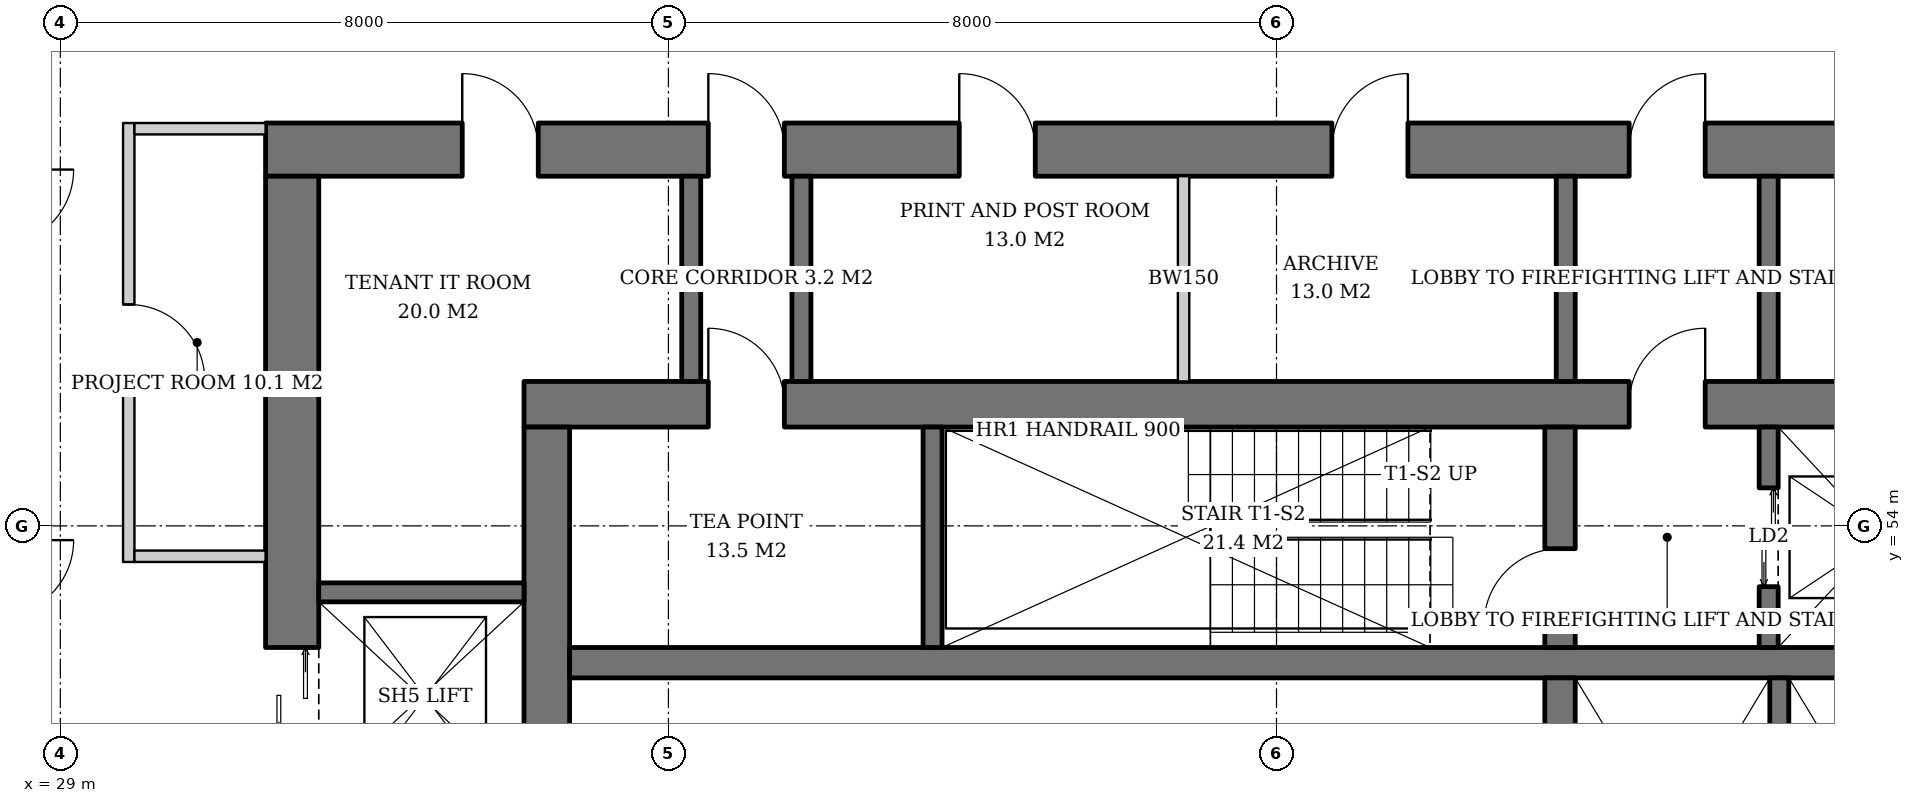
"""IFC4 building model, lengths in metres.
Left out: names, types, materials, properties, quantities, classifications, styles, units other than length and angle.
Written with IfcOpenShell. Run it as: python <this file> out.ifc"""

import sys

from ifc_helpers import new_model, si_unit, direction, frame, frame_2d, origin, place, context, subcontext, project, spatial, rectangle, extrude, element, fill, save


model = new_model("IFC4")
c1 = context("Model", 3, precision=1e-05, world=origin(), true_north=direction((0.0, 1.0)))
c2 = subcontext(c1, "Body", "Model", "MODEL_VIEW")
j1 = project(units=[si_unit("LENGTHUNIT", "METRE"), si_unit("PLANEANGLEUNIT", "RADIAN")], contexts=[c1])
p1 = place(None, origin())
s1 = spatial("IfcSite", under=j1, at=p1, CompositionType="ELEMENT")
p2 = place(p1, origin())
s2 = spatial("IfcBuilding", under=s1, at=p2, CompositionType="ELEMENT")
p3 = place(p2, frame((0.0, 0.0, 93.2)))
s3 = spatial("IfcBuildingStorey", under=s2, at=p3, CompositionType="ELEMENT", Elevation=93.2)
p4 = place(p3, frame((35.1, 55.6, 0.0), z_axis=(0.0, 0.0, 1.0), x_axis=(1.0, 0.0, 0.0)))
e1 = element("IfcWall", 1, at=p4, inside=s3, PredefinedType="SHEAR", context=c2, shape_type="SweptSolid", body=[
    extrude(rectangle(XDim=19.8, YDim=0.6, at=frame_2d((9.9, 0.0))), origin(), (0.0, 0.0, 1.0), 3.8),
])
p5 = place(p4, frame((14.54, 0.0, 0.0)))
e2 = element("IfcOpeningElement", 2, at=p5, cuts=e1, PredefinedType="OPENING", context=c2, shape_type="SweptSolid", body=[
    extrude(rectangle(XDim=1.0, YDim=2.1, at=frame_2d((0.5, 1.05))), frame((0.0, 0.31, 0.0), z_axis=(0.0, -1.0, 0.0), x_axis=(1.0, 0.0, 0.0)), (0.0, 0.0, 1.0), 0.62),
])
p6 = place(p4, frame((2.425, 0.0, 0.0)))
e3 = element("IfcOpeningElement", 3, at=p6, cuts=e1, PredefinedType="OPENING", context=c2, shape_type="SweptSolid", body=[
    extrude(rectangle(XDim=1.0, YDim=2.1, at=frame_2d((0.5, 1.05))), frame((0.0, 0.31, 0.0), z_axis=(0.0, -1.0, 0.0), x_axis=(1.0, 0.0, 0.0)), (0.0, 0.0, 1.0), 0.62),
])
p7 = place(p3, frame((35.4, 36.7, 0.0), z_axis=(0.0, 0.0, 1.0), x_axis=(0.0, 1.0, 0.0)))
e4 = element("IfcWall", 4, at=p7, inside=s3, PredefinedType="SHEAR", context=c2, shape_type="SweptSolid", body=[
    extrude(rectangle(XDim=18.6, YDim=0.6, at=frame_2d((9.3, 0.0))), origin(), (0.0, 0.0, 1.0), 3.8),
])
p8 = place(p7, frame((8.4, 0.0, 0.0)))
e5 = element("IfcOpeningElement", 5, at=p8, cuts=e4, PredefinedType="OPENING", context=c2, shape_type="SweptSolid", body=[
    extrude(rectangle(XDim=1.8, YDim=2.4, at=frame_2d((0.9, 1.2))), frame((0.0, 0.31, 0.0), z_axis=(0.0, -1.0, 0.0), x_axis=(1.0, 0.0, 0.0)), (0.0, 0.0, 1.0), 0.62),
])
p9 = place(p3, frame((31.7, 58.95, 0.0), z_axis=(0.0, 0.0, 1.0), x_axis=(1.0, 0.0, 0.0)))
e6 = element("IfcWall", 6, at=p9, inside=s3, PredefinedType="SHEAR", context=c2, shape_type="SweptSolid", body=[
    extrude(rectangle(XDim=26.6, YDim=0.7, at=frame_2d((13.3, 0.0))), origin(), (0.0, 0.0, 1.0), 3.8),
])
p10 = place(p9, frame((17.94, 0.0, 0.0)))
e7 = element("IfcOpeningElement", 7, at=p10, cuts=e6, PredefinedType="OPENING", context=c2, shape_type="SweptSolid", body=[
    extrude(rectangle(XDim=1.0, YDim=2.1, at=frame_2d((0.5, 1.05))), frame((0.0, 0.36, 0.0), z_axis=(0.0, -1.0, 0.0), x_axis=(1.0, 0.0, 0.0)), (0.0, 0.0, 1.0), 0.72),
])
p11 = place(p9, frame((5.825, 0.0, 0.0)))
e8 = element("IfcOpeningElement", 8, at=p11, cuts=e6, PredefinedType="OPENING", context=c2, shape_type="SweptSolid", body=[
    extrude(rectangle(XDim=1.0, YDim=2.1, at=frame_2d((0.5, 1.05))), frame((0.0, 0.36, 0.0), z_axis=(0.0, -1.0, 0.0), x_axis=(1.0, 0.0, 0.0)), (0.0, 0.0, 1.0), 0.72),
])
p12 = place(p9, frame((2.587, 0.0, 0.0)))
e9 = element("IfcOpeningElement", 9, at=p12, cuts=e6, PredefinedType="OPENING", context=c2, shape_type="SweptSolid", body=[
    extrude(rectangle(XDim=1.0, YDim=2.1, at=frame_2d((0.5, 1.05))), frame((0.0, 0.36, 0.0), z_axis=(0.0, -1.0, 0.0), x_axis=(1.0, 0.0, 0.0)), (0.0, 0.0, 1.0), 0.72),
])
p13 = place(p9, frame((9.126, 0.0, 0.0)))
e10 = element("IfcOpeningElement", 10, at=p13, cuts=e6, PredefinedType="OPENING", context=c2, shape_type="SweptSolid", body=[
    extrude(rectangle(XDim=1.0, YDim=2.1, at=frame_2d((0.5, 1.05))), frame((0.0, 0.36, 0.0), z_axis=(0.0, -1.0, 0.0), x_axis=(1.0, 0.0, 0.0)), (0.0, 0.0, 1.0), 0.72),
])
p14 = place(p9, frame((14.029, 0.0, 0.0)))
e11 = element("IfcOpeningElement", 11, at=p14, cuts=e6, PredefinedType="OPENING", context=c2, shape_type="SweptSolid", body=[
    extrude(rectangle(XDim=1.0, YDim=2.1, at=frame_2d((0.5, 1.05))), frame((0.0, 0.36, 0.0), z_axis=(0.0, -1.0, 0.0), x_axis=(1.0, 0.0, 0.0)), (0.0, 0.0, 1.0), 0.72),
])
p15 = place(p9, frame((22.4, 0.0, 0.0)))
e12 = element("IfcOpeningElement", 12, at=p15, cuts=e6, PredefinedType="OPENING", context=c2, shape_type="SweptSolid", body=[
    extrude(rectangle(XDim=1.0, YDim=2.1, at=frame_2d((0.5, 1.05))), frame((0.0, 0.36, 0.0), z_axis=(0.0, -1.0, 0.0), x_axis=(1.0, 0.0, 0.0)), (0.0, 0.0, 1.0), 0.72),
])
p16 = place(p3, frame((32.05, 33.4, 0.0), z_axis=(0.0, 0.0, 1.0), x_axis=(0.0, 1.0, 0.0)))
e13 = element("IfcWall", 13, at=p16, inside=s3, PredefinedType="SHEAR", context=c2, shape_type="SweptSolid", body=[
    extrude(rectangle(XDim=25.2, YDim=0.7, at=frame_2d((12.6, 0.0))), origin(), (0.0, 0.0, 1.0), 3.8),
])
p17 = place(p16, frame((3.45, 0.0, 0.0)))
e14 = element("IfcOpeningElement", 14, at=p17, cuts=e13, PredefinedType="OPENING", context=c2, shape_type="SweptSolid", body=[
    extrude(rectangle(XDim=1.3, YDim=2.2, at=frame_2d((0.65, 1.1))), frame((0.0, 0.36, 0.0), z_axis=(0.0, -1.0, 0.0), x_axis=(1.0, 0.0, 0.0)), (0.0, 0.0, 1.0), 0.72),
])
p18 = place(p16, frame((6.2, 0.0, 0.0)))
e15 = element("IfcOpeningElement", 15, at=p18, cuts=e13, PredefinedType="OPENING", context=c2, shape_type="SweptSolid", body=[
    extrude(rectangle(XDim=1.3, YDim=2.2, at=frame_2d((0.65, 1.1))), frame((0.0, 0.36, 0.0), z_axis=(0.0, -1.0, 0.0), x_axis=(1.0, 0.0, 0.0)), (0.0, 0.0, 1.0), 0.72),
])
p19 = place(p16, frame((8.95, 0.0, 0.0)))
e16 = element("IfcOpeningElement", 16, at=p19, cuts=e13, PredefinedType="OPENING", context=c2, shape_type="SweptSolid", body=[
    extrude(rectangle(XDim=1.3, YDim=2.2, at=frame_2d((0.65, 1.1))), frame((0.0, 0.36, 0.0), z_axis=(0.0, -1.0, 0.0), x_axis=(1.0, 0.0, 0.0)), (0.0, 0.0, 1.0), 0.72),
])
p20 = place(p16, frame((14.95, 0.0, 0.0)))
e17 = element("IfcOpeningElement", 17, at=p20, cuts=e13, PredefinedType="OPENING", context=c2, shape_type="SweptSolid", body=[
    extrude(rectangle(XDim=1.3, YDim=2.2, at=frame_2d((0.65, 1.1))), frame((0.0, 0.36, 0.0), z_axis=(0.0, -1.0, 0.0), x_axis=(1.0, 0.0, 0.0)), (0.0, 0.0, 1.0), 0.72),
])
p21 = place(p16, frame((17.7, 0.0, 0.0)))
e18 = element("IfcOpeningElement", 18, at=p21, cuts=e13, PredefinedType="OPENING", context=c2, shape_type="SweptSolid", body=[
    extrude(rectangle(XDim=1.3, YDim=2.2, at=frame_2d((0.65, 1.1))), frame((0.0, 0.36, 0.0), z_axis=(0.0, -1.0, 0.0), x_axis=(1.0, 0.0, 0.0)), (0.0, 0.0, 1.0), 0.72),
])
p22 = place(p16, frame((11.7, 0.0, 0.0)))
e19 = element("IfcOpeningElement", 19, at=p22, cuts=e13, PredefinedType="OPENING", context=c2, shape_type="SweptSolid", body=[
    extrude(rectangle(XDim=1.8, YDim=2.4, at=frame_2d((0.9, 1.2))), frame((0.0, 0.36, 0.0), z_axis=(0.0, -1.0, 0.0), x_axis=(1.0, 0.0, 0.0)), (0.0, 0.0, 1.0), 0.72),
])
p23 = place(p3, frame((35.7, 52.2, 0.0), z_axis=(0.0, 0.0, 1.0), x_axis=(1.0, 0.0, 0.0)))
e20 = element("IfcWall", 20, at=p23, inside=s3, PredefinedType="SHEAR", context=c2, shape_type="SweptSolid", body=[
    extrude(rectangle(XDim=18.6, YDim=0.4, at=frame_2d((9.3, 0.0))), origin(), (0.0, 0.0, 1.0), 3.8),
])
p24 = place(p3, frame((48.73, 40.0, 0.0), z_axis=(0.0, 0.0, 1.0), x_axis=(0.0, 1.0, 0.0)))
e21 = element("IfcWall", 21, at=p24, inside=s3, PredefinedType="SHEAR", context=c2, shape_type="SweptSolid", body=[
    extrude(rectangle(XDim=12.0, YDim=0.4, at=frame_2d((6.0, 0.0))), origin(), (0.0, 0.0, 1.0), 3.8),
])
p25 = place(p3, frame((48.73, 52.4, 0.0), z_axis=(0.0, 0.0, 1.0), x_axis=(0.0, 1.0, 0.0)))
e22 = element("IfcWall", 22, at=p25, inside=s3, PredefinedType="SHEAR", context=c2, shape_type="SweptSolid", body=[
    extrude(rectangle(XDim=2.9, YDim=0.4, at=frame_2d((1.45, 0.0))), origin(), (0.0, 0.0, 1.0), 3.8),
])
p26 = place(p25, frame((0.3, 0.0, 0.0)))
e23 = element("IfcOpeningElement", 23, at=p26, cuts=e22, PredefinedType="OPENING", context=c2, shape_type="SweptSolid", body=[
    extrude(rectangle(XDim=1.0, YDim=2.1, at=frame_2d((0.5, 1.05))), frame((0.0, 0.21, 0.0), z_axis=(0.0, -1.0, 0.0), x_axis=(1.0, 0.0, 0.0)), (0.0, 0.0, 1.0), 0.42),
])
p27 = place(p3, frame((40.475, 52.4, 0.0), z_axis=(0.0, 0.0, 1.0), x_axis=(0.0, 1.0, 0.0)))
e24 = element("IfcWall", 24, at=p27, inside=s3, PredefinedType="SHEAR", context=c2, shape_type="SweptSolid", body=[
    extrude(rectangle(XDim=2.9, YDim=0.25, at=frame_2d((1.45, 0.0))), origin(), (0.0, 0.0, 1.0), 3.8),
])
p28 = place(p3, frame((51.475, 52.4, 0.0), z_axis=(0.0, 0.0, 1.0), x_axis=(0.0, 1.0, 0.0)))
e25 = element("IfcWall", 25, at=p28, inside=s3, PredefinedType="SHEAR", context=c2, shape_type="SweptSolid", body=[
    extrude(rectangle(XDim=2.9, YDim=0.25, at=frame_2d((1.45, 0.0))), origin(), (0.0, 0.0, 1.0), 3.8),
])
p29 = place(p28, frame((0.8, 0.0, 0.0)))
e26 = element("IfcOpeningElement", 26, at=p29, cuts=e25, PredefinedType="OPENING", context=c2, shape_type="SweptSolid", body=[
    extrude(rectangle(XDim=1.3, YDim=2.2, at=frame_2d((0.65, 1.1))), frame((0.0, 0.135, 0.0), z_axis=(0.0, -1.0, 0.0), x_axis=(1.0, 0.0, 0.0)), (0.0, 0.0, 1.0), 0.27),
])
p30 = place(p3, frame((51.615, 47.75, 0.0), z_axis=(0.0, 0.0, 1.0), x_axis=(0.0, 1.0, 0.0)))
e27 = element("IfcWall", 27, at=p30, inside=s3, PredefinedType="SHEAR", context=c2, shape_type="SweptSolid", body=[
    extrude(rectangle(XDim=4.25, YDim=0.25, at=frame_2d((2.125, 0.0))), origin(), (0.0, 0.0, 1.0), 3.8),
])
p31 = place(p3, frame((32.4, 53.125, 0.0), z_axis=(0.0, 0.0, 1.0), x_axis=(1.0, 0.0, 0.0)))
e28 = element("IfcWall", 28, at=p31, inside=s3, PredefinedType="SHEAR", context=c2, shape_type="SweptSolid", body=[
    extrude(rectangle(XDim=2.7, YDim=0.25, at=frame_2d((1.35, 0.0))), origin(), (0.0, 0.0, 1.0), 3.8),
])
for number, where, z_axis, x_axis in (
    (29, (48.805, 55.9, 0.0), (0.0, 0.0, 1.0), (0.0, 1.0, 0.0)),
    (30, (51.475, 55.9, 0.0), (0.0, 0.0, 1.0), (0.0, 1.0, 0.0)),
    (31, (37.3, 55.9, 0.0), (0.0, 0.0, 1.0), (0.0, 1.0, 0.0)),
    (32, (38.75, 55.9, 0.0), (0.0, 0.0, 1.0), (0.0, 1.0, 0.0)),
):
    element("IfcWall", number, at=place(p3, frame(where, z_axis=z_axis, x_axis=x_axis)), inside=s3, PredefinedType="SOLIDWALL", context=c2, shape_type="SweptSolid", body=[
        extrude(rectangle(XDim=2.7, YDim=0.25, at=frame_2d((1.35, 0.0))), origin(), (0.0, 0.0, 1.0), 3.62),
    ])
p32 = place(p3, frame((43.778, 55.9, 0.0), z_axis=(0.0, 0.0, 1.0), x_axis=(0.0, 1.0, 0.0)))
e33 = element("IfcWall", 33, at=p32, inside=s3, PredefinedType="SOLIDWALL", context=c2, shape_type="SweptSolid", body=[
    extrude(rectangle(XDim=2.7, YDim=0.15, at=frame_2d((1.35, 0.0))), origin(), (0.0, 0.0, 1.0), 3.62),
])
p33 = place(p3, frame((29.9, 59.3, 0.0), z_axis=(0.0, 0.0, 1.0), x_axis=(0.0, -1.0, 0.0)))
e34 = element("IfcWall", 34, at=p33, inside=s3, PredefinedType="PARTITIONING", context=c2, shape_type="SweptSolid", body=[
    extrude(rectangle(XDim=5.775, YDim=0.15, at=frame_2d((2.888, 0.0))), origin(), (0.0, 0.0, 1.0), 2.72),
])
p34 = place(p33, frame((2.387, 0.0, 0.0)))
e35 = element("IfcOpeningElement", 35, at=p34, cuts=e34, PredefinedType="OPENING", context=c2, shape_type="SweptSolid", body=[
    extrude(rectangle(XDim=1.0, YDim=2.1, at=frame_2d((0.5, 1.05))), frame((0.0, 0.085, 0.0), z_axis=(0.0, -1.0, 0.0), x_axis=(1.0, 0.0, 0.0)), (0.0, 0.0, 1.0), 0.17),
])
for number, where, z_axis, x_axis in (
    (36, (31.7, 59.225, 0.0), (0.0, 0.0, 1.0), (-1.0, 0.0, 0.0)),
    (37, (31.7, 53.6, 0.0), (0.0, 0.0, 1.0), (-1.0, 0.0, 0.0)),
):
    element("IfcWall", number, at=place(p3, frame(where, z_axis=z_axis, x_axis=x_axis)), inside=s3, PredefinedType="PARTITIONING", context=c2, shape_type="SweptSolid", body=[
        extrude(rectangle(XDim=1.725, YDim=0.15, at=frame_2d((0.862, 0.0))), origin(), (0.0, 0.0, 1.0), 3.62),
    ])
p35 = place(p29, origin())
e38 = element("IfcDoor", 38, at=p35, inside=s3, OperationType="DOUBLE_DOOR_SLIDING", PredefinedType="DOOR", context=c2, shape_type="SweptSolid", body=[
    extrude(rectangle(XDim=1.3, YDim=2.2, at=frame_2d((0.65, 1.1))), frame((0.0, 0.025, 0.0), z_axis=(0.0, -1.0, 0.0), x_axis=(1.0, 0.0, 0.0)), (0.0, 0.0, 1.0), 0.05),
])
fill(e26, e38)
p36 = place(p26, origin())
e39 = element("IfcDoor", 39, at=p36, inside=s3, OperationType="SINGLE_SWING_LEFT", PredefinedType="DOOR", context=c2, shape_type="SweptSolid", body=[
    extrude(rectangle(XDim=1.0, YDim=2.1, at=frame_2d((0.5, 1.05))), frame((0.0, 0.025, 0.0), z_axis=(0.0, -1.0, 0.0), x_axis=(1.0, 0.0, 0.0)), (0.0, 0.0, 1.0), 0.05),
])
fill(e23, e39)
p37 = place(p5, origin())
e40 = element("IfcDoor", 40, at=p37, inside=s3, OperationType="SINGLE_SWING_RIGHT", PredefinedType="DOOR", context=c2, shape_type="SweptSolid", body=[
    extrude(rectangle(XDim=1.0, YDim=2.1, at=frame_2d((0.5, 1.05))), frame((0.0, 0.025, 0.0), z_axis=(0.0, -1.0, 0.0), x_axis=(1.0, 0.0, 0.0)), (0.0, 0.0, 1.0), 0.05),
])
fill(e2, e40)
p38 = place(p21, origin())
e41 = element("IfcDoor", 41, at=p38, inside=s3, OperationType="DOUBLE_DOOR_SLIDING", PredefinedType="DOOR", context=c2, shape_type="SweptSolid", body=[
    extrude(rectangle(XDim=1.3, YDim=2.2, at=frame_2d((0.65, 1.1))), frame((0.0, 0.025, 0.0), z_axis=(0.0, -1.0, 0.0), x_axis=(1.0, 0.0, 0.0)), (0.0, 0.0, 1.0), 0.05),
])
fill(e18, e41)
p39 = place(p10, origin())
e42 = element("IfcDoor", 42, at=p39, inside=s3, OperationType="SINGLE_SWING_RIGHT", PredefinedType="DOOR", context=c2, shape_type="SweptSolid", body=[
    extrude(rectangle(XDim=1.0, YDim=2.1, at=frame_2d((0.5, 1.05))), frame((0.0, 0.025, 0.0), z_axis=(0.0, -1.0, 0.0), x_axis=(1.0, 0.0, 0.0)), (0.0, 0.0, 1.0), 0.05),
])
fill(e7, e42)
p40 = place(p11, origin())
e43 = element("IfcDoor", 43, at=p40, inside=s3, OperationType="SINGLE_SWING_LEFT", PredefinedType="DOOR", context=c2, shape_type="SweptSolid", body=[
    extrude(rectangle(XDim=1.0, YDim=2.1, at=frame_2d((0.5, 1.05))), frame((0.0, 0.025, 0.0), z_axis=(0.0, -1.0, 0.0), x_axis=(1.0, 0.0, 0.0)), (0.0, 0.0, 1.0), 0.05),
])
fill(e8, e43)
p41 = place(p6, origin())
e44 = element("IfcDoor", 44, at=p41, inside=s3, OperationType="SINGLE_SWING_LEFT", PredefinedType="DOOR", context=c2, shape_type="SweptSolid", body=[
    extrude(rectangle(XDim=1.0, YDim=2.1, at=frame_2d((0.5, 1.05))), frame((0.0, -0.24, 0.0), z_axis=(0.0, -1.0, 0.0), x_axis=(1.0, 0.0, 0.0)), (0.0, 0.0, 1.0), 0.05),
])
fill(e3, e44)
p42 = place(p12, origin())
e45 = element("IfcDoor", 45, at=p42, inside=s3, OperationType="SINGLE_SWING_LEFT", PredefinedType="DOOR", context=c2, shape_type="SweptSolid", body=[
    extrude(rectangle(XDim=1.0, YDim=2.1, at=frame_2d((0.5, 1.05))), frame((0.0, -0.29, 0.0), z_axis=(0.0, -1.0, 0.0), x_axis=(1.0, 0.0, 0.0)), (0.0, 0.0, 1.0), 0.05),
])
fill(e9, e45)
p43 = place(p13, origin())
e46 = element("IfcDoor", 46, at=p43, inside=s3, OperationType="SINGLE_SWING_LEFT", PredefinedType="DOOR", context=c2, shape_type="SweptSolid", body=[
    extrude(rectangle(XDim=1.0, YDim=2.1, at=frame_2d((0.5, 1.05))), frame((0.0, -0.29, 0.0), z_axis=(0.0, -1.0, 0.0), x_axis=(1.0, 0.0, 0.0)), (0.0, 0.0, 1.0), 0.05),
])
fill(e10, e46)
p44 = place(p14, origin())
e47 = element("IfcDoor", 47, at=p44, inside=s3, OperationType="SINGLE_SWING_RIGHT", PredefinedType="DOOR", context=c2, shape_type="SweptSolid", body=[
    extrude(rectangle(XDim=1.0, YDim=2.1, at=frame_2d((0.5, 1.05))), frame((0.0, -0.29, 0.0), z_axis=(0.0, -1.0, 0.0), x_axis=(1.0, 0.0, 0.0)), (0.0, 0.0, 1.0), 0.05),
])
fill(e11, e47)
p45 = place(p34, origin())
e48 = element("IfcDoor", 48, at=p45, inside=s3, OperationType="SINGLE_SWING_RIGHT", PredefinedType="DOOR", context=c2, shape_type="SweptSolid", body=[
    extrude(rectangle(XDim=1.0, YDim=2.1, at=frame_2d((0.5, 1.05))), frame((0.0, 0.025, 0.0), z_axis=(0.0, -1.0, 0.0), x_axis=(1.0, 0.0, 0.0)), (0.0, 0.0, 1.0), 0.05),
])
fill(e35, e48)
save(model, sys.argv[1])
